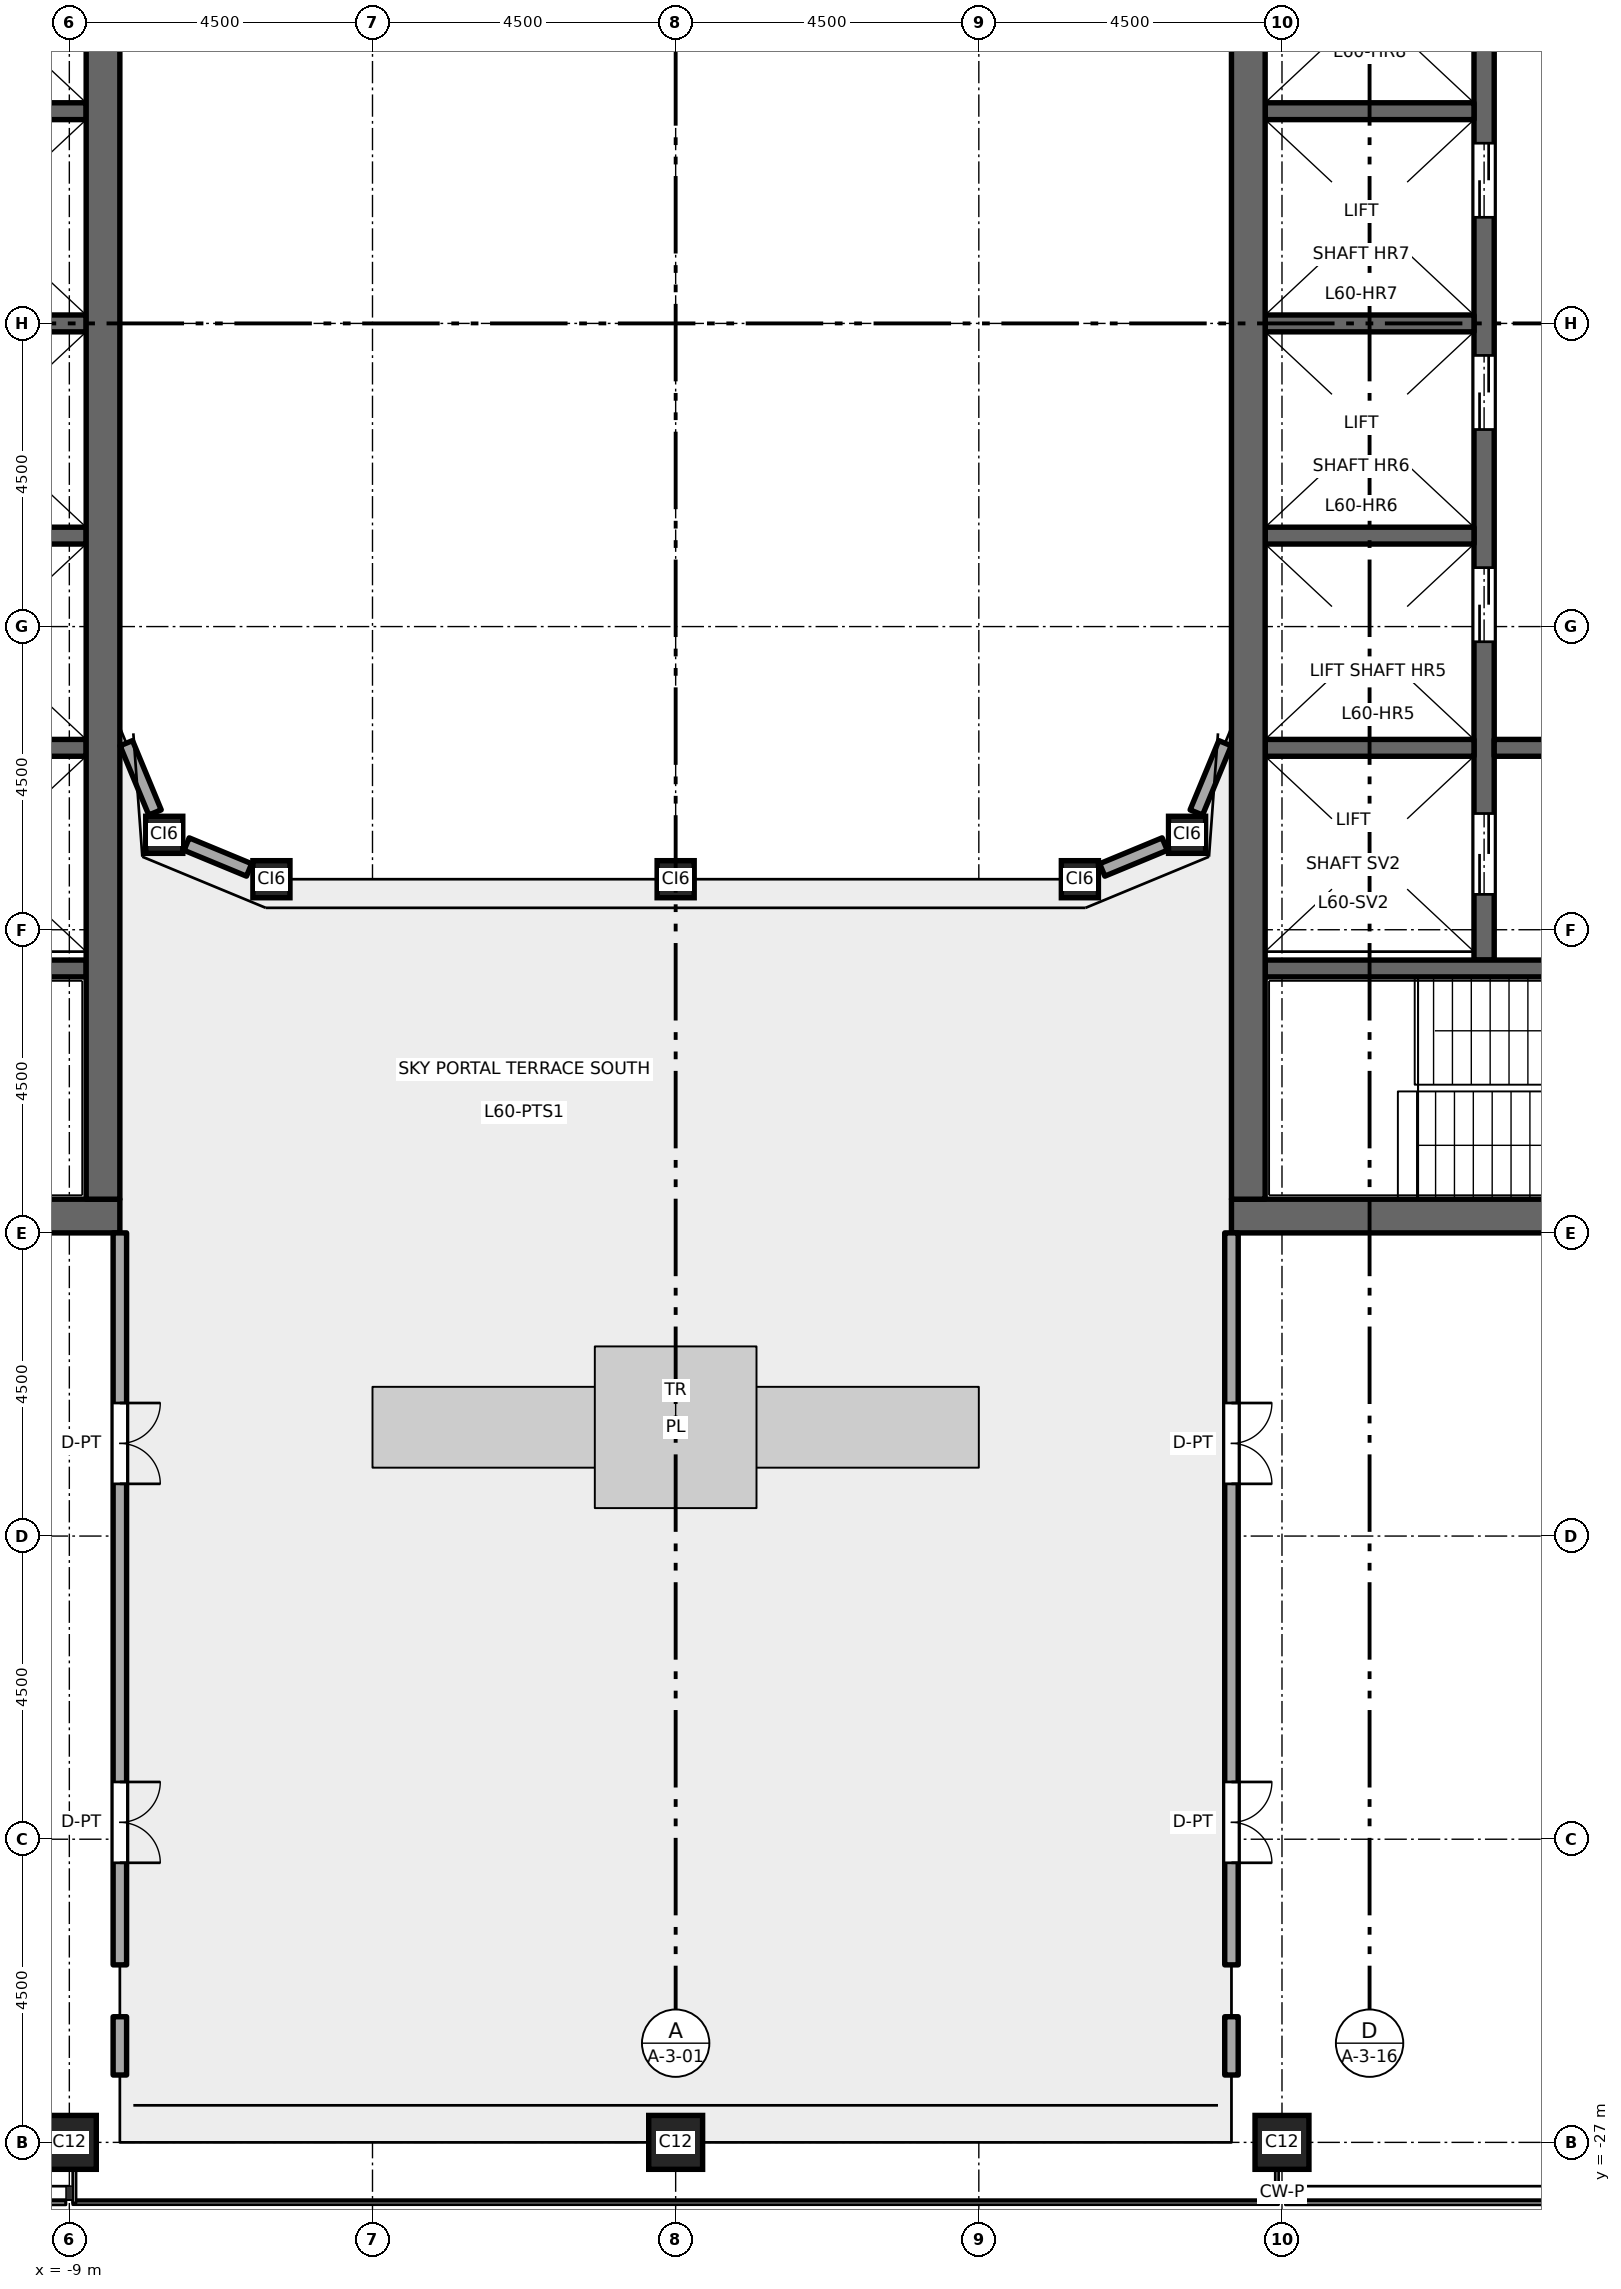
"""IFC4 building model, lengths in metres.
Left out: names, types, materials, properties, quantities, classifications, styles, units other than length and angle.
Written with IfcOpenShell. Run it as: python <this file> out.ifc"""

import sys

from ifc_helpers import new_model, si_unit, direction, frame, frame_2d, origin, origin_2d, place, context, subcontext, project, spatial, rectangle, hollow_rectangle, extrude, element, fill, save


model = new_model("IFC4")
c1 = context("Model", 3, precision=1e-05, world=origin(), true_north=direction((0.0, 1.0)))
c2 = subcontext(c1, "Body", "Model", "MODEL_VIEW")
j1 = project(units=[si_unit("LENGTHUNIT", "METRE"), si_unit("PLANEANGLEUNIT", "RADIAN")], contexts=[c1])
p1 = place(None, origin())
s1 = spatial("IfcSite", under=j1, at=p1, CompositionType="ELEMENT")
p2 = place(p1, origin())
s2 = spatial("IfcBuilding", under=s1, at=p2, CompositionType="ELEMENT")
p3 = place(p2, frame((0.0, 0.0, 278.2)))
s3 = spatial("IfcBuildingStorey", under=s2, at=p3, CompositionType="ELEMENT", Elevation=278.2)
for number, where, z_axis, x_axis in (
    (1, (-9.0, -27.0, 0.0), (0.0, 0.0, 1.0), (1.0, 0.0, 0.0)),
    (2, (0.0, -27.0, 0.0), (0.0, 0.0, 1.0), (1.0, 0.0, 0.0)),
    (3, (9.0, -27.0, 0.0), (0.0, 0.0, 1.0), (1.0, 0.0, 0.0)),
):
    element("IfcColumn", number, at=place(p3, frame(where, z_axis=z_axis, x_axis=x_axis)), inside=s3, PredefinedType="COLUMN", context=c2, shape_type="SweptSolid", body=[
        extrude(hollow_rectangle(XDim=0.8, YDim=0.8, WallThickness=0.045, at=origin_2d()), origin(), (0.0, 0.0, 1.0), 6.0),
    ])
for number, where, z_axis, x_axis in (
    (4, (-7.591, -7.591, 0.0), (0.0, 0.0, 1.0), (1.0, 0.0, 0.0)),
    (5, (-6.0, -8.25, 0.0), (0.0, 0.0, 1.0), (1.0, 0.0, 0.0)),
    (6, (0.0, -8.25, 0.0), (0.0, 0.0, 1.0), (1.0, 0.0, 0.0)),
    (7, (6.0, -8.25, 0.0), (0.0, 0.0, 1.0), (1.0, 0.0, 0.0)),
    (8, (7.591, -7.591, 0.0), (0.0, 0.0, 1.0), (1.0, 0.0, 0.0)),
):
    element("IfcColumn", number, at=place(p3, frame(where, z_axis=z_axis, x_axis=x_axis)), inside=s3, PredefinedType="COLUMN", context=c2, shape_type="SweptSolid", body=[
        extrude(hollow_rectangle(XDim=0.55, YDim=0.55, WallThickness=0.028, at=origin_2d()), origin(), (0.0, 0.0, 1.0), 6.0),
    ])
for number, where, z_axis, x_axis in (
    (9, (-8.75, 0.0, 0.0), (0.0, 0.0, 1.0), (-1.0, 0.0, 0.0)),
    (10, (-8.75, 3.15, 0.0), (0.0, 0.0, 1.0), (-1.0, 0.0, 0.0)),
    (11, (-8.75, -3.15, 0.0), (0.0, 0.0, 1.0), (-1.0, 0.0, 0.0)),
    (12, (-8.75, -6.3, 0.0), (0.0, 0.0, 1.0), (-1.0, 0.0, 0.0)),
):
    element("IfcWall", number, at=place(p3, frame(where, z_axis=z_axis, x_axis=x_axis)), inside=s3, PredefinedType="SHEAR", context=c2, shape_type="SweptSolid", body=[
        extrude(rectangle(XDim=3.1, YDim=0.25, at=frame_2d((1.55, 0.0))), origin(), (0.0, 0.0, 1.0), 5.8),
    ])
p4 = place(p3, frame((-8.75, -9.575, 0.0), z_axis=(0.0, 0.0, 1.0), x_axis=(-1.0, 0.0, 0.0)))
e13 = element("IfcWall", 13, at=p4, inside=s3, PredefinedType="SHEAR", context=c2, shape_type="SweptSolid", body=[
    extrude(rectangle(XDim=8.0, YDim=0.25, at=frame_2d((4.0, 0.0))), origin(), (0.0, 0.0, 1.0), 5.8),
])
p5 = place(p4, frame((6.65, 0.0, 0.0)))
e14 = element("IfcOpeningElement", 14, at=p5, cuts=e13, PredefinedType="OPENING", context=c2, shape_type="SweptSolid", body=[
    extrude(rectangle(XDim=1.1, YDim=2.1, at=frame_2d((0.55, 1.05))), frame((0.0, 0.135, 0.0), z_axis=(0.0, -1.0, 0.0), x_axis=(1.0, 0.0, 0.0)), (0.0, 0.0, 1.0), 0.27),
])
p6 = place(p3, frame((-8.25, -13.25, 0.0), z_axis=(0.0, 0.0, 1.0), x_axis=(-1.0, 0.0, 0.0)))
e15 = element("IfcWall", 15, at=p6, inside=s3, PredefinedType="SHEAR", context=c2, shape_type="SweptSolid", body=[
    extrude(rectangle(XDim=13.5, YDim=0.5, at=frame_2d((6.75, 0.0))), origin(), (0.0, 0.0, 1.0), 5.8),
])
p7 = place(p3, frame((-8.5, -13.0, 0.0), z_axis=(0.0, 0.0, 1.0), x_axis=(0.0, 1.0, 0.0)))
e16 = element("IfcWall", 16, at=p7, inside=s3, PredefinedType="SHEAR", context=c2, shape_type="SweptSolid", body=[
    extrude(rectangle(XDim=26.0, YDim=0.5, at=frame_2d((13.0, 0.0))), origin(), (0.0, 0.0, 1.0), 5.8),
])
p8 = place(p3, frame((12.0, -9.45, 0.0), z_axis=(0.0, 0.0, 1.0), x_axis=(0.0, 1.0, 0.0)))
e17 = element("IfcWall", 17, at=p8, inside=s3, PredefinedType="SHEAR", context=c2, shape_type="SweptSolid", body=[
    extrude(rectangle(XDim=18.9, YDim=0.3, at=frame_2d((9.45, 0.0))), origin(), (0.0, 0.0, 1.0), 5.8),
])
p9 = place(p8, frame((4.725, 0.0, 0.0)))
e18 = element("IfcOpeningElement", 18, at=p9, cuts=e17, PredefinedType="OPENING", context=c2, shape_type="SweptSolid", body=[
    extrude(rectangle(XDim=1.1, YDim=2.1, at=frame_2d((0.55, 1.05))), frame((0.0, 0.16, 0.0), z_axis=(0.0, -1.0, 0.0), x_axis=(1.0, 0.0, 0.0)), (0.0, 0.0, 1.0), 0.32),
])
p10 = place(p8, frame((7.875, 0.0, 0.0)))
e19 = element("IfcOpeningElement", 19, at=p10, cuts=e17, PredefinedType="OPENING", context=c2, shape_type="SweptSolid", body=[
    extrude(rectangle(XDim=1.1, YDim=2.1, at=frame_2d((0.55, 1.05))), frame((0.0, 0.16, 0.0), z_axis=(0.0, -1.0, 0.0), x_axis=(1.0, 0.0, 0.0)), (0.0, 0.0, 1.0), 0.32),
])
p11 = place(p8, frame((11.025, 0.0, 0.0)))
e20 = element("IfcOpeningElement", 20, at=p11, cuts=e17, PredefinedType="OPENING", context=c2, shape_type="SweptSolid", body=[
    extrude(rectangle(XDim=1.1, YDim=2.1, at=frame_2d((0.55, 1.05))), frame((0.0, 0.16, 0.0), z_axis=(0.0, -1.0, 0.0), x_axis=(1.0, 0.0, 0.0)), (0.0, 0.0, 1.0), 0.32),
])
p12 = place(p8, frame((14.175, 0.0, 0.0)))
e21 = element("IfcOpeningElement", 21, at=p12, cuts=e17, PredefinedType="OPENING", context=c2, shape_type="SweptSolid", body=[
    extrude(rectangle(XDim=1.1, YDim=2.1, at=frame_2d((0.55, 1.05))), frame((0.0, 0.16, 0.0), z_axis=(0.0, -1.0, 0.0), x_axis=(1.0, 0.0, 0.0)), (0.0, 0.0, 1.0), 0.32),
])
p13 = place(p8, frame((16.725, 0.0, 0.0)))
e22 = element("IfcOpeningElement", 22, at=p13, cuts=e17, PredefinedType="OPENING", context=c2, shape_type="SweptSolid", body=[
    extrude(rectangle(XDim=1.2, YDim=2.1, at=frame_2d((0.6, 1.05))), frame((0.0, 0.16, 0.0), z_axis=(0.0, -1.0, 0.0), x_axis=(1.0, 0.0, 0.0)), (0.0, 0.0, 1.0), 0.32),
])
p14 = place(p8, frame((0.975, 0.0, 0.0)))
e23 = element("IfcOpeningElement", 23, at=p14, cuts=e17, PredefinedType="OPENING", context=c2, shape_type="SweptSolid", body=[
    extrude(rectangle(XDim=1.2, YDim=2.1, at=frame_2d((0.6, 1.05))), frame((0.0, 0.16, 0.0), z_axis=(0.0, -1.0, 0.0), x_axis=(1.0, 0.0, 0.0)), (0.0, 0.0, 1.0), 0.32),
])
p15 = place(p3, frame((12.15, -6.3, 0.0), z_axis=(0.0, 0.0, 1.0), x_axis=(1.0, 0.0, 0.0)))
e24 = element("IfcWall", 24, at=p15, inside=s3, PredefinedType="SHEAR", context=c2, shape_type="SweptSolid", body=[
    extrude(rectangle(XDim=9.1, YDim=0.25, at=frame_2d((4.55, 0.0))), origin(), (0.0, 0.0, 1.0), 5.8),
])
p16 = place(p15, frame((1.8, 0.0, 0.0)))
e25 = element("IfcOpeningElement", 25, at=p16, cuts=e24, PredefinedType="OPENING", context=c2, shape_type="SweptSolid", body=[
    extrude(rectangle(XDim=1.0, YDim=2.1, at=frame_2d((0.5, 1.05))), frame((0.0, 0.135, 0.0), z_axis=(0.0, -1.0, 0.0), x_axis=(1.0, 0.0, 0.0)), (0.0, 0.0, 1.0), 0.27),
])
for number, where, z_axis, x_axis in (
    (26, (8.75, 0.0, 0.0), (0.0, 0.0, 1.0), (1.0, 0.0, 0.0)),
    (27, (8.75, 3.15, 0.0), (0.0, 0.0, 1.0), (1.0, 0.0, 0.0)),
    (28, (8.75, -3.15, 0.0), (0.0, 0.0, 1.0), (1.0, 0.0, 0.0)),
    (29, (8.75, -6.3, 0.0), (0.0, 0.0, 1.0), (1.0, 0.0, 0.0)),
):
    element("IfcWall", number, at=place(p3, frame(where, z_axis=z_axis, x_axis=x_axis)), inside=s3, PredefinedType="SHEAR", context=c2, shape_type="SweptSolid", body=[
        extrude(rectangle(XDim=3.1, YDim=0.25, at=frame_2d((1.55, 0.0))), origin(), (0.0, 0.0, 1.0), 5.8),
    ])
p17 = place(p3, frame((8.75, -9.575, 0.0), z_axis=(0.0, 0.0, 1.0), x_axis=(1.0, 0.0, 0.0)))
e30 = element("IfcWall", 30, at=p17, inside=s3, PredefinedType="SHEAR", context=c2, shape_type="SweptSolid", body=[
    extrude(rectangle(XDim=8.0, YDim=0.25, at=frame_2d((4.0, 0.0))), origin(), (0.0, 0.0, 1.0), 5.8),
])
p18 = place(p17, frame((6.65, 0.0, 0.0)))
e31 = element("IfcOpeningElement", 31, at=p18, cuts=e30, PredefinedType="OPENING", context=c2, shape_type="SweptSolid", body=[
    extrude(rectangle(XDim=1.1, YDim=2.1, at=frame_2d((0.55, 1.05))), frame((0.0, 0.135, 0.0), z_axis=(0.0, -1.0, 0.0), x_axis=(1.0, 0.0, 0.0)), (0.0, 0.0, 1.0), 0.27),
])
p19 = place(p3, frame((8.25, -13.25, 0.0), z_axis=(0.0, 0.0, 1.0), x_axis=(1.0, 0.0, 0.0)))
e32 = element("IfcWall", 32, at=p19, inside=s3, PredefinedType="SHEAR", context=c2, shape_type="SweptSolid", body=[
    extrude(rectangle(XDim=13.5, YDim=0.5, at=frame_2d((6.75, 0.0))), origin(), (0.0, 0.0, 1.0), 5.8),
])
p20 = place(p3, frame((8.5, -13.0, 0.0), z_axis=(0.0, 0.0, 1.0), x_axis=(0.0, 1.0, 0.0)))
e33 = element("IfcWall", 33, at=p20, inside=s3, PredefinedType="SHEAR", context=c2, shape_type="SweptSolid", body=[
    extrude(rectangle(XDim=26.0, YDim=0.5, at=frame_2d((13.0, 0.0))), origin(), (0.0, 0.0, 1.0), 5.8),
])
p21 = place(p3, frame((6.332, -8.113, 0.0), z_axis=(0.0, 0.0, 1.0), x_axis=(0.923859650767, 0.382731427616, 0.0)))
e34 = element("IfcWall", 34, at=p21, inside=s3, PredefinedType="STANDARD", context=c2, shape_type="SweptSolid", body=[
    extrude(rectangle(XDim=1.003, YDim=0.2, at=frame_2d((0.502, 0.0))), origin(), (0.0, 0.0, 1.0), 5.46),
])
for number, where, z_axis, x_axis in (
    (35, (7.729, -7.259, 0.0), (0.0, 0.0, 1.0), (0.383, 0.924, 0.0)),
    (36, (-8.154, -6.231, 0.0), (0.0, 0.0, 1.0), (0.383, -0.924, 0.0)),
):
    element("IfcWall", number, at=place(p3, frame(where, z_axis=z_axis, x_axis=x_axis)), inside=s3, PredefinedType="STANDARD", context=c2, shape_type="SweptSolid", body=[
        extrude(rectangle(XDim=1.113, YDim=0.2, at=frame_2d((0.556, 0.0))), origin(), (0.0, 0.0, 1.0), 5.46),
    ])
p22 = place(p3, frame((-7.259, -7.729, 0.0), z_axis=(0.0, 0.0, 1.0), x_axis=(0.923859650767, -0.382731427616, 0.0)))
e37 = element("IfcWall", 37, at=p22, inside=s3, PredefinedType="STANDARD", context=c2, shape_type="SweptSolid", body=[
    extrude(rectangle(XDim=1.003, YDim=0.2, at=frame_2d((0.502, 0.0))), origin(), (0.0, 0.0, 1.0), 5.46),
])
p23 = place(p3, frame((-8.25, -13.5, 0.0), z_axis=(0.0, 0.0, 1.0), x_axis=(0.0, -1.0, 0.0)))
e38 = element("IfcWall", 38, at=p23, inside=s3, PredefinedType="STANDARD", context=c2, shape_type="SweptSolid", body=[
    extrude(rectangle(XDim=10.865, YDim=0.2, at=frame_2d((5.433, 0.0))), origin(), (0.0, 0.0, 1.0), 5.8),
])
p24 = place(p23, frame((2.525, 0.0, 0.0)))
e39 = element("IfcOpeningElement", 39, at=p24, cuts=e38, PredefinedType="OPENING", context=c2, shape_type="SweptSolid", body=[
    extrude(rectangle(XDim=1.2, YDim=2.4, at=frame_2d((0.6, 1.2))), frame((0.0, 0.11, 0.0), z_axis=(0.0, -1.0, 0.0), x_axis=(1.0, 0.0, 0.0)), (0.0, 0.0, 1.0), 0.22),
])
p25 = place(p23, frame((8.15, 0.0, 0.0)))
e40 = element("IfcOpeningElement", 40, at=p25, cuts=e38, PredefinedType="OPENING", context=c2, shape_type="SweptSolid", body=[
    extrude(rectangle(XDim=1.2, YDim=2.4, at=frame_2d((0.6, 1.2))), frame((0.0, 0.11, 0.0), z_axis=(0.0, -1.0, 0.0), x_axis=(1.0, 0.0, 0.0)), (0.0, 0.0, 1.0), 0.22),
])
p26 = place(p3, frame((-8.25, -25.135, 0.0), z_axis=(0.0, 0.0, 1.0), x_axis=(0.0, -1.0, 0.0)))
e41 = element("IfcWall", 41, at=p26, inside=s3, PredefinedType="STANDARD", context=c2, shape_type="SweptSolid", body=[
    extrude(rectangle(XDim=0.865, YDim=0.2, at=frame_2d((0.433, 0.0))), origin(), (0.0, 0.0, 1.0), 5.8),
])
p27 = place(p3, frame((8.25, -13.5, 0.0), z_axis=(0.0, 0.0, 1.0), x_axis=(0.0, -1.0, 0.0)))
e42 = element("IfcWall", 42, at=p27, inside=s3, PredefinedType="STANDARD", context=c2, shape_type="SweptSolid", body=[
    extrude(rectangle(XDim=10.865, YDim=0.2, at=frame_2d((5.433, 0.0))), origin(), (0.0, 0.0, 1.0), 5.8),
])
p28 = place(p27, frame((2.525, 0.0, 0.0)))
e43 = element("IfcOpeningElement", 43, at=p28, cuts=e42, PredefinedType="OPENING", context=c2, shape_type="SweptSolid", body=[
    extrude(rectangle(XDim=1.2, YDim=2.4, at=frame_2d((0.6, 1.2))), frame((0.0, 0.11, 0.0), z_axis=(0.0, -1.0, 0.0), x_axis=(1.0, 0.0, 0.0)), (0.0, 0.0, 1.0), 0.22),
])
p29 = place(p27, frame((8.15, 0.0, 0.0)))
e44 = element("IfcOpeningElement", 44, at=p29, cuts=e42, PredefinedType="OPENING", context=c2, shape_type="SweptSolid", body=[
    extrude(rectangle(XDim=1.2, YDim=2.4, at=frame_2d((0.6, 1.2))), frame((0.0, 0.11, 0.0), z_axis=(0.0, -1.0, 0.0), x_axis=(1.0, 0.0, 0.0)), (0.0, 0.0, 1.0), 0.22),
])
p30 = place(p3, frame((8.25, -25.135, 0.0), z_axis=(0.0, 0.0, 1.0), x_axis=(0.0, -1.0, 0.0)))
e45 = element("IfcWall", 45, at=p30, inside=s3, PredefinedType="STANDARD", context=c2, shape_type="SweptSolid", body=[
    extrude(rectangle(XDim=0.865, YDim=0.2, at=frame_2d((0.433, 0.0))), origin(), (0.0, 0.0, 1.0), 5.8),
])
p31 = place(p9, origin())
e46 = element("IfcDoor", 46, at=p31, inside=s3, OperationType="DOUBLE_DOOR_SLIDING", PredefinedType="DOOR", context=c2, shape_type="SweptSolid", body=[
    extrude(rectangle(XDim=1.1, YDim=2.1, at=frame_2d((0.55, 1.05))), frame((0.0, 0.025, 0.0), z_axis=(0.0, -1.0, 0.0), x_axis=(1.0, 0.0, 0.0)), (0.0, 0.0, 1.0), 0.05),
])
fill(e18, e46)
p32 = place(p10, origin())
e47 = element("IfcDoor", 47, at=p32, inside=s3, OperationType="DOUBLE_DOOR_SLIDING", PredefinedType="DOOR", context=c2, shape_type="SweptSolid", body=[
    extrude(rectangle(XDim=1.1, YDim=2.1, at=frame_2d((0.55, 1.05))), frame((0.0, 0.025, 0.0), z_axis=(0.0, -1.0, 0.0), x_axis=(1.0, 0.0, 0.0)), (0.0, 0.0, 1.0), 0.05),
])
fill(e19, e47)
p33 = place(p11, origin())
e48 = element("IfcDoor", 48, at=p33, inside=s3, OperationType="DOUBLE_DOOR_SLIDING", PredefinedType="DOOR", context=c2, shape_type="SweptSolid", body=[
    extrude(rectangle(XDim=1.1, YDim=2.1, at=frame_2d((0.55, 1.05))), frame((0.0, 0.025, 0.0), z_axis=(0.0, -1.0, 0.0), x_axis=(1.0, 0.0, 0.0)), (0.0, 0.0, 1.0), 0.05),
])
fill(e20, e48)
p34 = place(p14, origin())
e49 = element("IfcDoor", 49, at=p34, inside=s3, OperationType="DOUBLE_DOOR_SLIDING", PredefinedType="DOOR", context=c2, shape_type="SweptSolid", body=[
    extrude(rectangle(XDim=1.2, YDim=2.1, at=frame_2d((0.6, 1.05))), frame((0.0, 0.025, 0.0), z_axis=(0.0, -1.0, 0.0), x_axis=(1.0, 0.0, 0.0)), (0.0, 0.0, 1.0), 0.05),
])
fill(e23, e49)
p35 = place(p24, origin())
e50 = element("IfcDoor", 50, at=p35, inside=s3, OperationType="DOUBLE_DOOR_SINGLE_SWING", PredefinedType="DOOR", context=c2, shape_type="SweptSolid", body=[
    extrude(rectangle(XDim=1.2, YDim=2.4, at=frame_2d((0.6, 1.2))), frame((0.0, 0.025, 0.0), z_axis=(0.0, -1.0, 0.0), x_axis=(1.0, 0.0, 0.0)), (0.0, 0.0, 1.0), 0.05),
])
fill(e39, e50)
p36 = place(p25, origin())
e51 = element("IfcDoor", 51, at=p36, inside=s3, OperationType="DOUBLE_DOOR_SINGLE_SWING", PredefinedType="DOOR", context=c2, shape_type="SweptSolid", body=[
    extrude(rectangle(XDim=1.2, YDim=2.4, at=frame_2d((0.6, 1.2))), frame((0.0, 0.025, 0.0), z_axis=(0.0, -1.0, 0.0), x_axis=(1.0, 0.0, 0.0)), (0.0, 0.0, 1.0), 0.05),
])
fill(e40, e51)
p37 = place(p28, origin())
e52 = element("IfcDoor", 52, at=p37, inside=s3, OperationType="DOUBLE_DOOR_SINGLE_SWING", PredefinedType="DOOR", context=c2, shape_type="SweptSolid", body=[
    extrude(rectangle(XDim=1.2, YDim=2.4, at=frame_2d((0.6, 1.2))), frame((0.0, 0.025, 0.0), z_axis=(0.0, -1.0, 0.0), x_axis=(1.0, 0.0, 0.0)), (0.0, 0.0, 1.0), 0.05),
])
fill(e43, e52)
p38 = place(p29, origin())
e53 = element("IfcDoor", 53, at=p38, inside=s3, OperationType="DOUBLE_DOOR_SINGLE_SWING", PredefinedType="DOOR", context=c2, shape_type="SweptSolid", body=[
    extrude(rectangle(XDim=1.2, YDim=2.4, at=frame_2d((0.6, 1.2))), frame((0.0, 0.025, 0.0), z_axis=(0.0, -1.0, 0.0), x_axis=(1.0, 0.0, 0.0)), (0.0, 0.0, 1.0), 0.05),
])
fill(e44, e53)
save(model, sys.argv[1])
